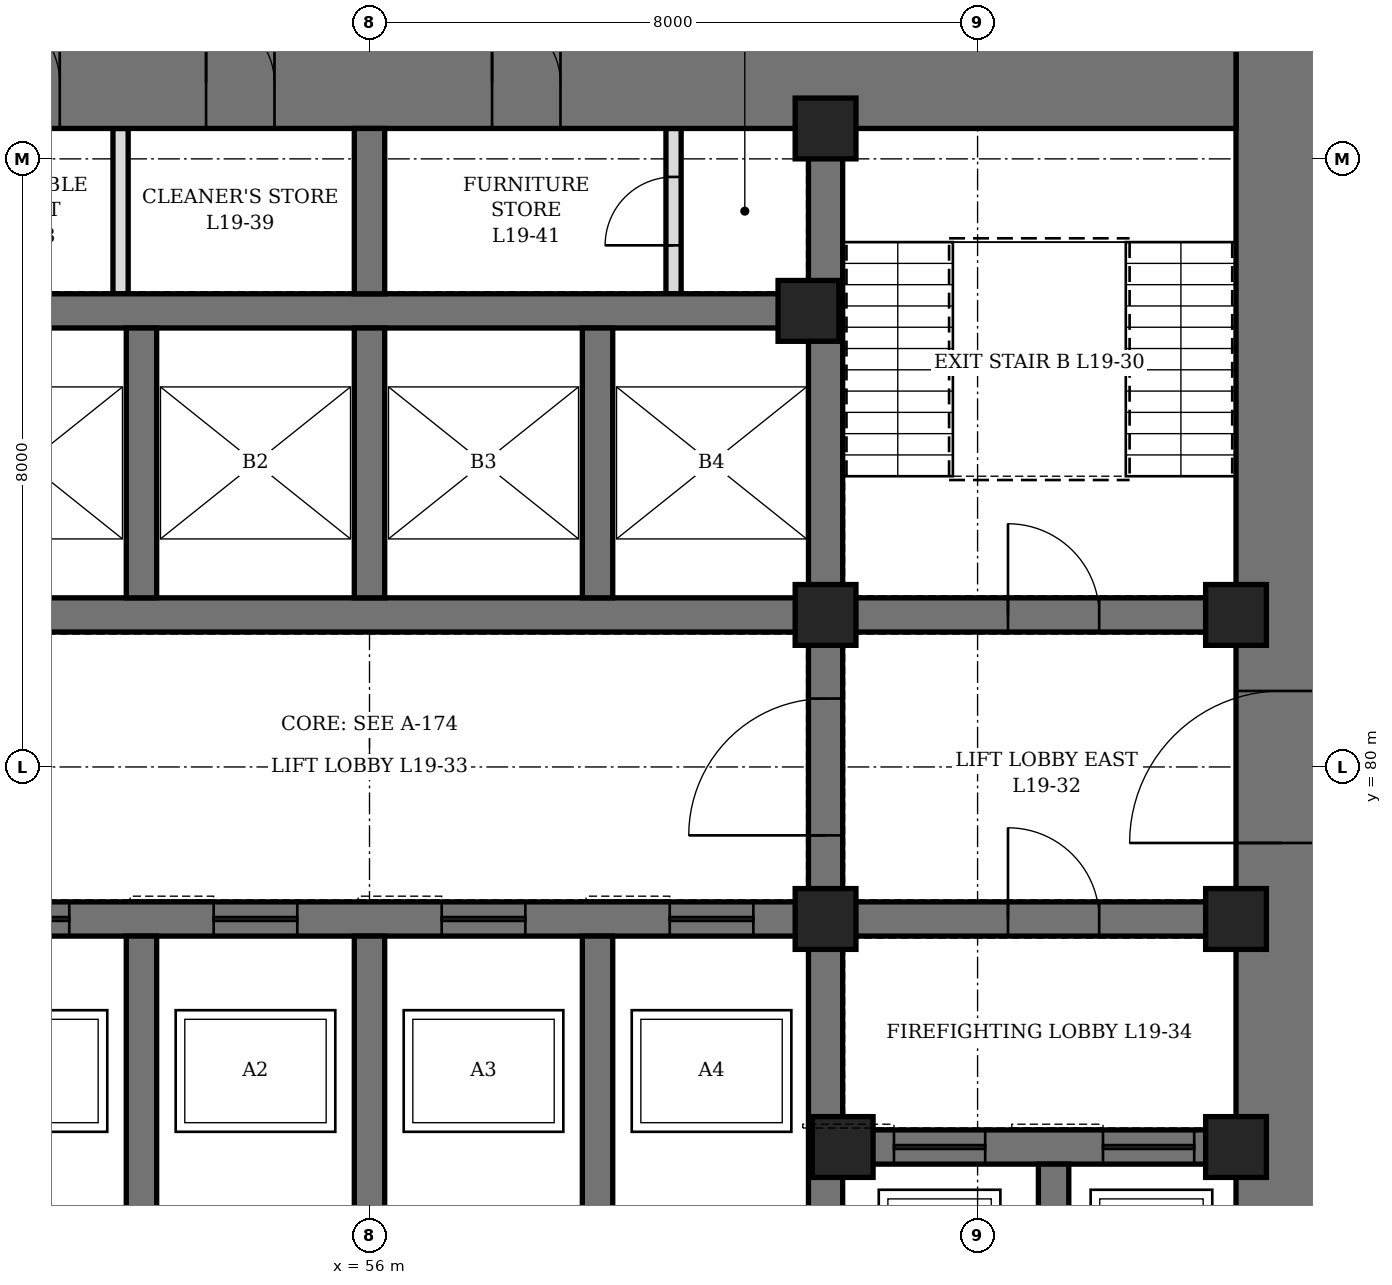
"""IFC4 building model, lengths in metres.
Left out: names, types, materials, properties, quantities, classifications, styles, units other than length and angle.
Written with IfcOpenShell. Run it as: python <this file> out.ifc"""

import sys

from ifc_helpers import new_model, si_unit, direction, frame, frame_2d, origin, origin_2d, place, context, subcontext, project, spatial, rectangle, hollow_rectangle, extrude, element, fill, save


model = new_model("IFC4")
c1 = context("Model", 3, precision=1e-05, world=origin(), true_north=direction((0.0, 1.0)))
c2 = subcontext(c1, "Body", "Model", "MODEL_VIEW")
j1 = project(units=[si_unit("LENGTHUNIT", "METRE"), si_unit("PLANEANGLEUNIT", "RADIAN")], contexts=[c1])
p1 = place(None, origin())
s1 = spatial("IfcSite", under=j1, at=p1, CompositionType="ELEMENT")
p2 = place(p1, origin())
s2 = spatial("IfcBuilding", under=s1, at=p2, CompositionType="ELEMENT")
p3 = place(p2, frame((0.0, 0.0, 89.5)))
s3 = spatial("IfcBuildingStorey", under=s2, at=p3, CompositionType="ELEMENT", Elevation=89.5)
p4 = place(p3, frame((68.0, 70.4, 0.0), z_axis=(0.0, 0.0, 1.0), x_axis=(0.0, 1.0, 0.0)))
e1 = element("IfcWall", 1, at=p4, inside=s3, PredefinedType="SHEAR", context=c2, shape_type="SweptSolid", body=[
    extrude(rectangle(XDim=19.2, YDim=1.2, at=frame_2d((9.6, 0.0))), origin(), (0.0, 0.0, 1.0), 4.2),
])
p5 = place(p4, frame((8.6, 0.0, 0.0)))
e2 = element("IfcOpeningElement", 2, at=p5, cuts=e1, PredefinedType="OPENING", context=c2, shape_type="SweptSolid", body=[
    extrude(rectangle(XDim=2.0, YDim=2.4, at=frame_2d((1.0, 1.2))), frame((0.0, 0.61, 0.0), z_axis=(0.0, -1.0, 0.0), x_axis=(1.0, 0.0, 0.0)), (0.0, 0.0, 1.0), 1.22),
])
p6 = place(p3, frame((44.6, 89.0, 0.0), z_axis=(0.0, 0.0, 1.0), x_axis=(1.0, 0.0, 0.0)))
e3 = element("IfcWall", 3, at=p6, inside=s3, PredefinedType="SHEAR", context=c2, shape_type="SweptSolid", body=[
    extrude(rectangle(XDim=22.8, YDim=1.2, at=frame_2d((11.4, 0.0))), origin(), (0.0, 0.0, 1.0), 4.2),
])
p7 = place(p6, frame((6.325, 0.0, 0.0)))
e4 = element("IfcOpeningElement", 4, at=p7, cuts=e3, PredefinedType="OPENING", context=c2, shape_type="SweptSolid", body=[
    extrude(rectangle(XDim=1.0, YDim=2.1, at=frame_2d((0.5, 1.05))), frame((0.0, 0.61, 0.0), z_axis=(0.0, -1.0, 0.0), x_axis=(1.0, 0.0, 0.0)), (0.0, 0.0, 1.0), 1.22),
])
p8 = place(p6, frame((9.25, 0.0, 0.0)))
e5 = element("IfcOpeningElement", 5, at=p8, cuts=e3, PredefinedType="OPENING", context=c2, shape_type="SweptSolid", body=[
    extrude(rectangle(XDim=0.9, YDim=2.1, at=frame_2d((0.45, 1.05))), frame((0.0, 0.61, 0.0), z_axis=(0.0, -1.0, 0.0), x_axis=(1.0, 0.0, 0.0)), (0.0, 0.0, 1.0), 1.22),
])
p9 = place(p6, frame((13.012, 0.0, 0.0)))
e6 = element("IfcOpeningElement", 6, at=p9, cuts=e3, PredefinedType="OPENING", context=c2, shape_type="SweptSolid", body=[
    extrude(rectangle(XDim=0.9, YDim=2.1, at=frame_2d((0.45, 1.05))), frame((0.0, 0.61, 0.0), z_axis=(0.0, -1.0, 0.0), x_axis=(1.0, 0.0, 0.0)), (0.0, 0.0, 1.0), 1.22),
])
p10 = place(p3, frame((62.0, 71.6, 0.0), z_axis=(0.0, 0.0, 1.0), x_axis=(0.0, 1.0, 0.0)))
e7 = element("IfcWall", 7, at=p10, inside=s3, PredefinedType="SHEAR", context=c2, shape_type="SweptSolid", body=[
    extrude(rectangle(XDim=16.8, YDim=0.45, at=frame_2d((8.4, 0.0))), origin(), (0.0, 0.0, 1.0), 4.2),
])
p11 = place(p10, frame((7.5, 0.0, 0.0)))
e8 = element("IfcOpeningElement", 8, at=p11, cuts=e7, PredefinedType="OPENING", context=c2, shape_type="SweptSolid", body=[
    extrude(rectangle(XDim=1.8, YDim=2.4, at=frame_2d((0.9, 1.2))), frame((0.0, 0.235, 0.0), z_axis=(0.0, -1.0, 0.0), x_axis=(1.0, 0.0, 0.0)), (0.0, 0.0, 1.0), 0.47),
])
p12 = place(p3, frame((62.225, 75.0, 0.0), z_axis=(0.0, 0.0, 1.0), x_axis=(1.0, 0.0, 0.0)))
e9 = element("IfcWall", 9, at=p12, inside=s3, PredefinedType="SHEAR", context=c2, shape_type="SweptSolid", body=[
    extrude(rectangle(XDim=5.175, YDim=0.45, at=frame_2d((2.587, 0.0))), origin(), (0.0, 0.0, 1.0), 4.2),
])
p13 = place(p12, frame((0.675, 0.0, 0.0)))
e10 = element("IfcOpeningElement", 10, at=p13, cuts=e9, PredefinedType="OPENING", context=c2, shape_type="SweptSolid", body=[
    extrude(rectangle(XDim=1.2, YDim=2.2, at=frame_2d((0.6, 1.1))), frame((0.0, 0.235, 0.0), z_axis=(0.0, -1.0, 0.0), x_axis=(1.0, 0.0, 0.0)), (0.0, 0.0, 1.0), 0.47),
])
p14 = place(p12, frame((3.425, 0.0, 0.0)))
e11 = element("IfcOpeningElement", 11, at=p14, cuts=e9, PredefinedType="OPENING", context=c2, shape_type="SweptSolid", body=[
    extrude(rectangle(XDim=1.2, YDim=2.2, at=frame_2d((0.6, 1.1))), frame((0.0, 0.235, 0.0), z_axis=(0.0, -1.0, 0.0), x_axis=(1.0, 0.0, 0.0)), (0.0, 0.0, 1.0), 0.47),
])
p15 = place(p3, frame((62.225, 78.0, 0.0), z_axis=(0.0, 0.0, 1.0), x_axis=(1.0, 0.0, 0.0)))
e12 = element("IfcWall", 12, at=p15, inside=s3, PredefinedType="SHEAR", context=c2, shape_type="SweptSolid", body=[
    extrude(rectangle(XDim=5.175, YDim=0.45, at=frame_2d((2.587, 0.0))), origin(), (0.0, 0.0, 1.0), 4.2),
])
p16 = place(p15, frame((2.175, 0.0, 0.0)))
e13 = element("IfcOpeningElement", 13, at=p16, cuts=e12, PredefinedType="OPENING", context=c2, shape_type="SweptSolid", body=[
    extrude(rectangle(XDim=1.2, YDim=2.1, at=frame_2d((0.6, 1.05))), frame((0.0, 0.235, 0.0), z_axis=(0.0, -1.0, 0.0), x_axis=(1.0, 0.0, 0.0)), (0.0, 0.0, 1.0), 0.47),
])
p17 = place(p3, frame((62.225, 82.0, 0.0), z_axis=(0.0, 0.0, 1.0), x_axis=(1.0, 0.0, 0.0)))
e14 = element("IfcWall", 14, at=p17, inside=s3, PredefinedType="SHEAR", context=c2, shape_type="SweptSolid", body=[
    extrude(rectangle(XDim=5.175, YDim=0.45, at=frame_2d((2.587, 0.0))), origin(), (0.0, 0.0, 1.0), 4.2),
])
p18 = place(p17, frame((2.175, 0.0, 0.0)))
e15 = element("IfcOpeningElement", 15, at=p18, cuts=e14, PredefinedType="OPENING", context=c2, shape_type="SweptSolid", body=[
    extrude(rectangle(XDim=1.2, YDim=2.1, at=frame_2d((0.6, 1.05))), frame((0.0, 0.235, 0.0), z_axis=(0.0, -1.0, 0.0), x_axis=(1.0, 0.0, 0.0)), (0.0, 0.0, 1.0), 0.47),
])
p19 = place(p3, frame((50.225, 78.0, 0.0), z_axis=(0.0, 0.0, 1.0), x_axis=(1.0, 0.0, 0.0)))
e16 = element("IfcWall", 16, at=p19, inside=s3, PredefinedType="SHEAR", context=c2, shape_type="SweptSolid", body=[
    extrude(rectangle(XDim=11.55, YDim=0.45, at=frame_2d((5.775, 0.0))), origin(), (0.0, 0.0, 1.0), 4.2),
])
p20 = place(p19, frame((0.725, 0.0, 0.0)))
e17 = element("IfcOpeningElement", 17, at=p20, cuts=e16, PredefinedType="OPENING", context=c2, shape_type="SweptSolid", body=[
    extrude(rectangle(XDim=1.1, YDim=2.2, at=frame_2d((0.55, 1.1))), frame((0.0, 0.235, 0.0), z_axis=(0.0, -1.0, 0.0), x_axis=(1.0, 0.0, 0.0)), (0.0, 0.0, 1.0), 0.47),
])
p21 = place(p19, frame((3.725, 0.0, 0.0)))
e18 = element("IfcOpeningElement", 18, at=p21, cuts=e16, PredefinedType="OPENING", context=c2, shape_type="SweptSolid", body=[
    extrude(rectangle(XDim=1.1, YDim=2.2, at=frame_2d((0.55, 1.1))), frame((0.0, 0.235, 0.0), z_axis=(0.0, -1.0, 0.0), x_axis=(1.0, 0.0, 0.0)), (0.0, 0.0, 1.0), 0.47),
])
p22 = place(p19, frame((6.725, 0.0, 0.0)))
e19 = element("IfcOpeningElement", 19, at=p22, cuts=e16, PredefinedType="OPENING", context=c2, shape_type="SweptSolid", body=[
    extrude(rectangle(XDim=1.1, YDim=2.2, at=frame_2d((0.55, 1.1))), frame((0.0, 0.235, 0.0), z_axis=(0.0, -1.0, 0.0), x_axis=(1.0, 0.0, 0.0)), (0.0, 0.0, 1.0), 0.47),
])
p23 = place(p19, frame((9.725, 0.0, 0.0)))
e20 = element("IfcOpeningElement", 20, at=p23, cuts=e16, PredefinedType="OPENING", context=c2, shape_type="SweptSolid", body=[
    extrude(rectangle(XDim=1.1, YDim=2.2, at=frame_2d((0.55, 1.1))), frame((0.0, 0.235, 0.0), z_axis=(0.0, -1.0, 0.0), x_axis=(1.0, 0.0, 0.0)), (0.0, 0.0, 1.0), 0.47),
])
for number, where, z_axis, x_axis in (
    (21, (50.225, 82.0, 0.0), (0.0, 0.0, 1.0), (1.0, 0.0, 0.0)),
    (22, (50.225, 86.0, 0.0), (0.0, 0.0, 1.0), (1.0, 0.0, 0.0)),
):
    element("IfcWall", number, at=place(p3, frame(where, z_axis=z_axis, x_axis=x_axis)), inside=s3, PredefinedType="SHEAR", context=c2, shape_type="SweptSolid", body=[
        extrude(rectangle(XDim=11.55, YDim=0.45, at=frame_2d((5.775, 0.0))), origin(), (0.0, 0.0, 1.0), 4.2),
    ])
p24 = place(p3, frame((53.0, 74.2, 0.0), z_axis=(0.0, 0.0, 1.0), x_axis=(0.0, 1.0, 0.0)))
e23 = element("IfcWall", 23, at=p24, inside=s3, PredefinedType="SHEAR", context=c2, shape_type="SweptSolid", body=[
    extrude(rectangle(XDim=3.575, YDim=0.4, at=frame_2d((1.788, 0.0))), origin(), (0.0, 0.0, 1.0), 4.2),
])
p25 = place(p3, frame((53.0, 82.225, 0.0), z_axis=(0.0, 0.0, 1.0), x_axis=(0.0, 1.0, 0.0)))
e24 = element("IfcWall", 24, at=p25, inside=s3, PredefinedType="SHEAR", context=c2, shape_type="SweptSolid", body=[
    extrude(rectangle(XDim=3.55, YDim=0.4, at=frame_2d((1.775, 0.0))), origin(), (0.0, 0.0, 1.0), 4.2),
])
p26 = place(p3, frame((56.0, 74.2, 0.0), z_axis=(0.0, 0.0, 1.0), x_axis=(0.0, 1.0, 0.0)))
e25 = element("IfcWall", 25, at=p26, inside=s3, PredefinedType="SHEAR", context=c2, shape_type="SweptSolid", body=[
    extrude(rectangle(XDim=3.575, YDim=0.4, at=frame_2d((1.788, 0.0))), origin(), (0.0, 0.0, 1.0), 4.2),
])
p27 = place(p3, frame((56.0, 82.225, 0.0), z_axis=(0.0, 0.0, 1.0), x_axis=(0.0, 1.0, 0.0)))
e26 = element("IfcWall", 26, at=p27, inside=s3, PredefinedType="SHEAR", context=c2, shape_type="SweptSolid", body=[
    extrude(rectangle(XDim=3.55, YDim=0.4, at=frame_2d((1.775, 0.0))), origin(), (0.0, 0.0, 1.0), 4.2),
])
p28 = place(p3, frame((59.0, 74.2, 0.0), z_axis=(0.0, 0.0, 1.0), x_axis=(0.0, 1.0, 0.0)))
e27 = element("IfcWall", 27, at=p28, inside=s3, PredefinedType="SHEAR", context=c2, shape_type="SweptSolid", body=[
    extrude(rectangle(XDim=3.575, YDim=0.4, at=frame_2d((1.788, 0.0))), origin(), (0.0, 0.0, 1.0), 4.2),
])
p29 = place(p3, frame((59.0, 82.225, 0.0), z_axis=(0.0, 0.0, 1.0), x_axis=(0.0, 1.0, 0.0)))
e28 = element("IfcWall", 28, at=p29, inside=s3, PredefinedType="SHEAR", context=c2, shape_type="SweptSolid", body=[
    extrude(rectangle(XDim=3.55, YDim=0.4, at=frame_2d((1.775, 0.0))), origin(), (0.0, 0.0, 1.0), 4.2),
])
p30 = place(p3, frame((65.0, 71.6, 0.0), z_axis=(0.0, 0.0, 1.0), x_axis=(0.0, 1.0, 0.0)))
e29 = element("IfcWall", 29, at=p30, inside=s3, PredefinedType="SHEAR", context=c2, shape_type="SweptSolid", body=[
    extrude(rectangle(XDim=3.175, YDim=0.4, at=frame_2d((1.587, 0.0))), origin(), (0.0, 0.0, 1.0), 4.2),
])
p31 = place(p3, frame((56.0, 86.225, 0.0), z_axis=(0.0, 0.0, 1.0), x_axis=(0.0, 1.0, 0.0)))
e30 = element("IfcWall", 30, at=p31, inside=s3, PredefinedType="SHEAR", context=c2, shape_type="SweptSolid", body=[
    extrude(rectangle(XDim=2.175, YDim=0.4, at=frame_2d((1.087, 0.0))), origin(), (0.0, 0.0, 1.0), 4.2),
])
for number, where, z_axis, x_axis in (
    (31, (61.775, 86.0, 0.0), (0.0, 0.0, 1.0), (1.0, 0.0, 0.0)),
    (32, (62.0, 78.0, 0.0), (0.0, 0.0, 1.0), (1.0, 0.0, 0.0)),
    (33, (62.0, 82.0, 0.0), (0.0, 0.0, 1.0), (1.0, 0.0, 0.0)),
    (34, (62.0, 88.4, 0.0), (0.0, 0.0, 1.0), (1.0, 0.0, 0.0)),
    (35, (62.225, 75.0, 0.0), (0.0, 0.0, 1.0), (1.0, 0.0, 0.0)),
    (36, (67.4, 75.0, 0.0), (0.0, 0.0, 1.0), (1.0, 0.0, 0.0)),
    (37, (67.4, 78.0, 0.0), (0.0, 0.0, 1.0), (1.0, 0.0, 0.0)),
    (38, (67.4, 82.0, 0.0), (0.0, 0.0, 1.0), (1.0, 0.0, 0.0)),
):
    element("IfcColumn", number, at=place(p3, frame(where, z_axis=z_axis, x_axis=x_axis)), inside=s3, PredefinedType="COLUMN", context=c2, shape_type="SweptSolid", body=[
        extrude(hollow_rectangle(XDim=0.8, YDim=0.8, WallThickness=0.1, at=origin_2d()), origin(), (0.0, 0.0, 1.0), 4.2),
    ])
p32 = place(p3, frame((52.725, 86.225, 0.0), z_axis=(0.0, 0.0, 1.0), x_axis=(0.0, 1.0, 0.0)))
e39 = element("IfcWall", 39, at=p32, inside=s3, PredefinedType="PARTITIONING", context=c2, shape_type="SweptSolid", body=[
    extrude(rectangle(XDim=2.175, YDim=0.2, at=frame_2d((1.087, 0.0))), origin(), (0.0, 0.0, 1.0), 4.04),
])
p33 = place(p3, frame((60.0, 86.225, 0.0), z_axis=(0.0, 0.0, 1.0), x_axis=(0.0, 1.0, 0.0)))
e40 = element("IfcWall", 40, at=p33, inside=s3, PredefinedType="PARTITIONING", context=c2, shape_type="SweptSolid", body=[
    extrude(rectangle(XDim=2.175, YDim=0.2, at=frame_2d((1.087, 0.0))), origin(), (0.0, 0.0, 1.0), 4.04),
])
p34 = place(p33, frame((0.637, 0.0, 0.0)))
e41 = element("IfcOpeningElement", 41, at=p34, cuts=e40, PredefinedType="OPENING", context=c2, shape_type="SweptSolid", body=[
    extrude(rectangle(XDim=0.9, YDim=2.1, at=frame_2d((0.45, 1.05))), frame((0.0, 0.11, 0.0), z_axis=(0.0, -1.0, 0.0), x_axis=(1.0, 0.0, 0.0)), (0.0, 0.0, 1.0), 0.22),
])
p35 = place(p7, origin())
e42 = element("IfcDoor", 42, at=p35, inside=s3, OperationType="SINGLE_SWING_LEFT", PredefinedType="DOOR", context=c2, shape_type="SweptSolid", body=[
    extrude(rectangle(XDim=1.0, YDim=2.1, at=frame_2d((0.5, 1.05))), frame((0.0, 0.35, 0.0), z_axis=(0.0, -1.0, 0.0), x_axis=(1.0, 0.0, 0.0)), (0.0, 0.0, 1.0), 0.7),
])
fill(e4, e42)
p36 = place(p8, origin())
e43 = element("IfcDoor", 43, at=p36, inside=s3, OperationType="SINGLE_SWING_LEFT", PredefinedType="DOOR", context=c2, shape_type="SweptSolid", body=[
    extrude(rectangle(XDim=0.9, YDim=2.1, at=frame_2d((0.45, 1.05))), frame((0.0, 0.35, 0.0), z_axis=(0.0, -1.0, 0.0), x_axis=(1.0, 0.0, 0.0)), (0.0, 0.0, 1.0), 0.7),
])
fill(e5, e43)
p37 = place(p9, origin())
e44 = element("IfcDoor", 44, at=p37, inside=s3, OperationType="SINGLE_SWING_LEFT", PredefinedType="DOOR", context=c2, shape_type="SweptSolid", body=[
    extrude(rectangle(XDim=0.9, YDim=2.1, at=frame_2d((0.45, 1.05))), frame((0.0, 0.35, 0.0), z_axis=(0.0, -1.0, 0.0), x_axis=(1.0, 0.0, 0.0)), (0.0, 0.0, 1.0), 0.7),
])
fill(e6, e44)
p38 = place(p34, origin())
e45 = element("IfcDoor", 45, at=p38, inside=s3, OperationType="SINGLE_SWING_LEFT", PredefinedType="DOOR", context=c2, shape_type="SweptSolid", body=[
    extrude(rectangle(XDim=0.9, YDim=2.1, at=frame_2d((0.45, 1.05))), frame((0.0, 0.1, 0.0), z_axis=(0.0, -1.0, 0.0), x_axis=(1.0, 0.0, 0.0)), (0.0, 0.0, 1.0), 0.199),
])
fill(e41, e45)
p39 = place(p18, origin())
e46 = element("IfcDoor", 46, at=p39, inside=s3, OperationType="SINGLE_SWING_LEFT", PredefinedType="DOOR", context=c2, shape_type="SweptSolid", body=[
    extrude(rectangle(XDim=1.2, YDim=2.1, at=frame_2d((0.6, 1.05))), frame((0.0, 0.225, 0.0), z_axis=(0.0, -1.0, 0.0), x_axis=(1.0, 0.0, 0.0)), (0.0, 0.0, 1.0), 0.449),
])
fill(e15, e46)
p40 = place(p5, origin())
e47 = element("IfcDoor", 47, at=p40, inside=s3, OperationType="DOUBLE_DOOR_SINGLE_SWING", PredefinedType="DOOR", context=c2, shape_type="SweptSolid", body=[
    extrude(rectangle(XDim=2.0, YDim=2.4, at=frame_2d((1.0, 1.2))), frame((0.0, 0.35, 0.0), z_axis=(0.0, -1.0, 0.0), x_axis=(1.0, 0.0, 0.0)), (0.0, 0.0, 1.0), 0.7),
])
fill(e2, e47)
p41 = place(p11, origin())
e48 = element("IfcDoor", 48, at=p41, inside=s3, OperationType="DOUBLE_DOOR_SINGLE_SWING", PredefinedType="DOOR", context=c2, shape_type="SweptSolid", body=[
    extrude(rectangle(XDim=1.8, YDim=2.4, at=frame_2d((0.9, 1.2))), frame((0.0, 0.225, 0.0), z_axis=(0.0, -1.0, 0.0), x_axis=(1.0, 0.0, 0.0)), (0.0, 0.0, 1.0), 0.449),
])
fill(e8, e48)
p42 = place(p16, origin())
e49 = element("IfcDoor", 49, at=p42, inside=s3, OperationType="SINGLE_SWING_RIGHT", PredefinedType="DOOR", context=c2, shape_type="SweptSolid", body=[
    extrude(rectangle(XDim=1.2, YDim=2.1, at=frame_2d((0.6, 1.05))), frame((0.0, 0.225, 0.0), z_axis=(0.0, -1.0, 0.0), x_axis=(1.0, 0.0, 0.0)), (0.0, 0.0, 1.0), 0.449),
])
fill(e13, e49)
p43 = place(p20, origin())
e50 = element("IfcDoor", 50, at=p43, inside=s3, OperationType="SLIDING_TO_LEFT", PredefinedType="DOOR", context=c2, shape_type="SweptSolid", body=[
    extrude(rectangle(XDim=1.1, YDim=2.2, at=frame_2d((0.55, 1.1))), frame((0.0, 0.225, 0.0), z_axis=(0.0, -1.0, 0.0), x_axis=(1.0, 0.0, 0.0)), (0.0, 0.0, 1.0), 0.449),
])
fill(e17, e50)
p44 = place(p21, origin())
e51 = element("IfcDoor", 51, at=p44, inside=s3, OperationType="SLIDING_TO_LEFT", PredefinedType="DOOR", context=c2, shape_type="SweptSolid", body=[
    extrude(rectangle(XDim=1.1, YDim=2.2, at=frame_2d((0.55, 1.1))), frame((0.0, 0.225, 0.0), z_axis=(0.0, -1.0, 0.0), x_axis=(1.0, 0.0, 0.0)), (0.0, 0.0, 1.0), 0.449),
])
fill(e18, e51)
p45 = place(p22, origin())
e52 = element("IfcDoor", 52, at=p45, inside=s3, OperationType="SLIDING_TO_LEFT", PredefinedType="DOOR", context=c2, shape_type="SweptSolid", body=[
    extrude(rectangle(XDim=1.1, YDim=2.2, at=frame_2d((0.55, 1.1))), frame((0.0, 0.225, 0.0), z_axis=(0.0, -1.0, 0.0), x_axis=(1.0, 0.0, 0.0)), (0.0, 0.0, 1.0), 0.449),
])
fill(e19, e52)
p46 = place(p23, origin())
e53 = element("IfcDoor", 53, at=p46, inside=s3, OperationType="SLIDING_TO_LEFT", PredefinedType="DOOR", context=c2, shape_type="SweptSolid", body=[
    extrude(rectangle(XDim=1.1, YDim=2.2, at=frame_2d((0.55, 1.1))), frame((0.0, 0.225, 0.0), z_axis=(0.0, -1.0, 0.0), x_axis=(1.0, 0.0, 0.0)), (0.0, 0.0, 1.0), 0.449),
])
fill(e20, e53)
p47 = place(p13, origin())
e54 = element("IfcDoor", 54, at=p47, inside=s3, OperationType="SLIDING_TO_LEFT", PredefinedType="DOOR", context=c2, shape_type="SweptSolid", body=[
    extrude(rectangle(XDim=1.2, YDim=2.2, at=frame_2d((0.6, 1.1))), frame((0.0, 0.225, 0.0), z_axis=(0.0, -1.0, 0.0), x_axis=(1.0, 0.0, 0.0)), (0.0, 0.0, 1.0), 0.449),
])
fill(e10, e54)
p48 = place(p14, origin())
e55 = element("IfcDoor", 55, at=p48, inside=s3, OperationType="SLIDING_TO_LEFT", PredefinedType="DOOR", context=c2, shape_type="SweptSolid", body=[
    extrude(rectangle(XDim=1.2, YDim=2.2, at=frame_2d((0.6, 1.1))), frame((0.0, 0.225, 0.0), z_axis=(0.0, -1.0, 0.0), x_axis=(1.0, 0.0, 0.0)), (0.0, 0.0, 1.0), 0.449),
])
fill(e11, e55)
save(model, sys.argv[1])
